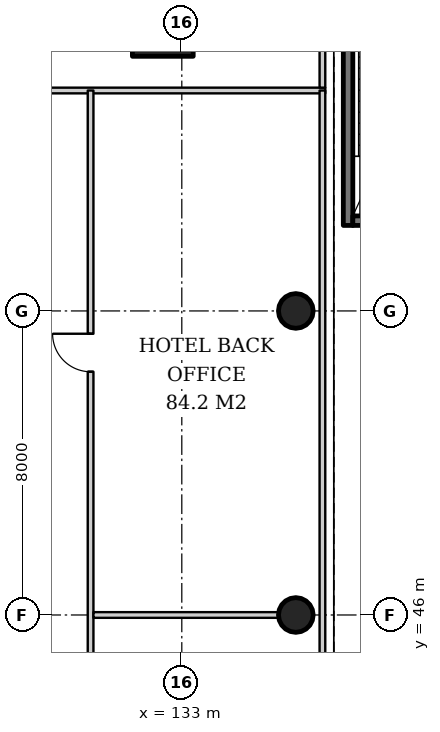
"""IFC4 building model, lengths in metres.
Left out: names, types, materials, properties, quantities, classifications, styles, units other than length and angle.
Written with IfcOpenShell. Run it as: python <this file> out.ifc"""

import sys

from ifc_helpers import new_model, si_unit, direction, frame, frame_2d, origin, origin_2d, place, context, subcontext, project, spatial, rectangle, hollow_circle, extrude, element, fill, save


model = new_model("IFC4")
c1 = context("Model", 3, precision=1e-05, world=origin(), true_north=direction((0.0, 1.0)))
c2 = subcontext(c1, "Body", "Model", "MODEL_VIEW")
j1 = project(units=[si_unit("LENGTHUNIT", "METRE"), si_unit("PLANEANGLEUNIT", "RADIAN")], contexts=[c1])
p1 = place(None, origin())
s1 = spatial("IfcSite", under=j1, at=p1, CompositionType="ELEMENT")
p2 = place(p1, origin())
s2 = spatial("IfcBuilding", under=s1, at=p2, CompositionType="ELEMENT")
p3 = place(p2, origin())
s3 = spatial("IfcBuildingStorey", under=s2, at=p3, CompositionType="ELEMENT", Elevation=0.0)
p4 = place(p3, frame((132.5, 61.5, 0.0), z_axis=(0.0, 0.0, 1.0), x_axis=(1.0, 0.0, 0.0)))
e1 = element("IfcColumn", 1, at=p4, inside=s3, PredefinedType="COLUMN", context=c2, shape_type="SweptSolid", body=[
    extrude(rectangle(XDim=1.6, YDim=1.6, at=origin_2d()), origin(), (0.0, 0.0, 1.0), 6.0),
])
for number, where, z_axis, x_axis in (
    (2, (136.0, 46.0, 0.0), (0.0, 0.0, 1.0), (1.0, 0.0, 0.0)),
    (3, (136.0, 54.0, 0.0), (0.0, 0.0, 1.0), (1.0, 0.0, 0.0)),
):
    element("IfcColumn", number, at=place(p3, frame(where, z_axis=z_axis, x_axis=x_axis)), inside=s3, PredefinedType="COLUMN", context=c2, shape_type="SweptSolid", body=[
        extrude(hollow_circle(Radius=0.457, WallThickness=0.03, at=origin_2d()), origin(), (0.0, 0.0, 1.0), 6.0),
    ])
p5 = place(p3, frame((137.375, 56.25, 0.0), z_axis=(0.0, 0.0, 1.0), x_axis=(0.0, 1.0, 0.0)))
e4 = element("IfcWall", 4, at=p5, inside=s3, PredefinedType="SOLIDWALL", context=c2, shape_type="SweptSolid", body=[
    extrude(rectangle(XDim=8.5, YDim=0.25, at=frame_2d((4.25, 0.0))), origin(), (0.0, 0.0, 1.0), 5.7),
])
p6 = place(p3, frame((137.5, 56.375, 0.0), z_axis=(0.0, 0.0, 1.0), x_axis=(1.0, 0.0, 0.0)))
e5 = element("IfcWall", 5, at=p6, inside=s3, PredefinedType="SOLIDWALL", context=c2, shape_type="SweptSolid", body=[
    extrude(rectangle(XDim=3.0, YDim=0.25, at=frame_2d((1.5, 0.0))), origin(), (0.0, 0.0, 1.0), 5.7),
])
p7 = place(p3, frame((97.225, 59.8, 0.0), z_axis=(0.0, 0.0, 1.0), x_axis=(1.0, 0.0, 0.0)))
e6 = element("IfcWall", 6, at=p7, inside=s3, PredefinedType="PARTITIONING", context=c2, shape_type="SweptSolid", body=[
    extrude(rectangle(XDim=39.55, YDim=0.15, at=frame_2d((19.775, 0.0))), origin(), (0.0, 0.0, 1.0), 4.9),
])
p8 = place(p7, frame((7.425, 0.0, 0.0)))
e7 = element("IfcOpeningElement", 7, at=p8, cuts=e6, PredefinedType="OPENING", context=c2, shape_type="SweptSolid", body=[
    extrude(rectangle(XDim=1.0, YDim=2.1, at=frame_2d((0.5, 1.05))), frame((0.0, 0.085, 0.0), z_axis=(0.0, -1.0, 0.0), x_axis=(1.0, 0.0, 0.0)), (0.0, 0.0, 1.0), 0.17),
])
p9 = place(p7, frame((19.275, 0.0, 0.0)))
e8 = element("IfcOpeningElement", 8, at=p9, cuts=e6, PredefinedType="OPENING", context=c2, shape_type="SweptSolid", body=[
    extrude(rectangle(XDim=1.0, YDim=2.1, at=frame_2d((0.5, 1.05))), frame((0.0, 0.085, 0.0), z_axis=(0.0, -1.0, 0.0), x_axis=(1.0, 0.0, 0.0)), (0.0, 0.0, 1.0), 0.17),
])
p10 = place(p7, frame((31.125, 0.0, 0.0)))
e9 = element("IfcOpeningElement", 9, at=p10, cuts=e6, PredefinedType="OPENING", context=c2, shape_type="SweptSolid", body=[
    extrude(rectangle(XDim=1.0, YDim=2.1, at=frame_2d((0.5, 1.05))), frame((0.0, 0.085, 0.0), z_axis=(0.0, -1.0, 0.0), x_axis=(1.0, 0.0, 0.0)), (0.0, 0.0, 1.0), 0.17),
])
p11 = place(p3, frame((136.7, 59.875, 0.0), z_axis=(0.0, 0.0, 1.0), x_axis=(0.0, 1.0, 0.0)))
e10 = element("IfcWall", 10, at=p11, inside=s3, PredefinedType="PARTITIONING", context=c2, shape_type="SweptSolid", body=[
    extrude(rectangle(XDim=5.75, YDim=0.15, at=frame_2d((2.875, 0.0))), origin(), (0.0, 0.0, 1.0), 5.7),
])
p12 = place(p3, frame((130.6, 32.2, 0.0), z_axis=(0.0, 0.0, 1.0), x_axis=(0.0, 1.0, 0.0)))
e11 = element("IfcWall", 11, at=p12, inside=s3, PredefinedType="PARTITIONING", context=c2, shape_type="SweptSolid", body=[
    extrude(rectangle(XDim=27.6, YDim=0.15, at=frame_2d((13.8, 0.0))), origin(), (0.0, 0.0, 1.0), 4.9),
])
p13 = place(p12, frame((6.4, 0.0, 0.0)))
e12 = element("IfcOpeningElement", 12, at=p13, cuts=e11, PredefinedType="OPENING", context=c2, shape_type="SweptSolid", body=[
    extrude(rectangle(XDim=1.0, YDim=2.1, at=frame_2d((0.5, 1.05))), frame((0.0, 0.085, 0.0), z_axis=(0.0, -1.0, 0.0), x_axis=(1.0, 0.0, 0.0)), (0.0, 0.0, 1.0), 0.17),
])
p14 = place(p12, frame((20.2, 0.0, 0.0)))
e13 = element("IfcOpeningElement", 13, at=p14, cuts=e11, PredefinedType="OPENING", context=c2, shape_type="SweptSolid", body=[
    extrude(rectangle(XDim=1.0, YDim=2.1, at=frame_2d((0.5, 1.05))), frame((0.0, 0.085, 0.0), z_axis=(0.0, -1.0, 0.0), x_axis=(1.0, 0.0, 0.0)), (0.0, 0.0, 1.0), 0.17),
])
p15 = place(p3, frame((136.7, 32.2, 0.0), z_axis=(0.0, 0.0, 1.0), x_axis=(0.0, 1.0, 0.0)))
e14 = element("IfcWall", 14, at=p15, inside=s3, PredefinedType="PARTITIONING", context=c2, shape_type="SweptSolid", body=[
    extrude(rectangle(XDim=27.6, YDim=0.15, at=frame_2d((13.8, 0.0))), origin(), (0.0, 0.0, 1.0), 5.7),
])
p16 = place(p3, frame((130.675, 46.0, 0.0), z_axis=(0.0, 0.0, 1.0), x_axis=(1.0, 0.0, 0.0)))
e15 = element("IfcWall", 15, at=p16, inside=s3, PredefinedType="PARTITIONING", context=c2, shape_type="SweptSolid", body=[
    extrude(rectangle(XDim=4.868, YDim=0.15, at=frame_2d((2.434, 0.0))), origin(), (0.0, 0.0, 1.0), 5.7),
])
p17 = place(p14, origin())
e16 = element("IfcDoor", 16, at=p17, inside=s3, OperationType="SINGLE_SWING_RIGHT", PredefinedType="DOOR", context=c2, shape_type="SweptSolid", body=[
    extrude(rectangle(XDim=1.0, YDim=2.1, at=frame_2d((0.5, 1.05))), frame((0.0, 0.025, 0.0), z_axis=(0.0, -1.0, 0.0), x_axis=(1.0, 0.0, 0.0)), (0.0, 0.0, 1.0), 0.05),
])
fill(e13, e16)
save(model, sys.argv[1])
